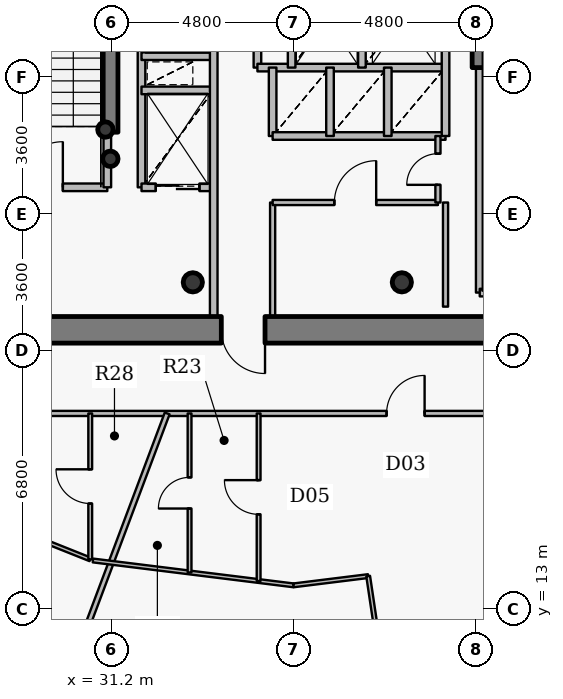
"""IFC4 building model, lengths in metres.
Left out: names, types, materials, properties, quantities, classifications, styles, units other than length and angle.
Written with IfcOpenShell. Run it as: python <this file> out.ifc"""

import sys

from ifc_helpers import new_model, si_unit, direction, frame, frame_2d, origin, origin_2d, place, context, subcontext, project, spatial, rectangle, hollow_circle, extrude, source, transform, mapped, element, fill, save


model = new_model("IFC4")
c1 = context("Model", 3, precision=1e-05, world=origin(), true_north=direction((0.0, 1.0)))
c2 = subcontext(c1, "Body", "Model", "MODEL_VIEW")
j1 = project(units=[si_unit("LENGTHUNIT", "METRE"), si_unit("PLANEANGLEUNIT", "RADIAN")], contexts=[c1])
p1 = place(None, origin())
s1 = spatial("IfcSite", under=j1, at=p1, CompositionType="ELEMENT")
p2 = place(p1, origin())
s2 = spatial("IfcBuilding", under=s1, at=p2, CompositionType="ELEMENT")
p3 = place(p2, frame((0.0, 0.0, 225.3)))
s3 = spatial("IfcBuildingStorey", under=s2, at=p3, CompositionType="ELEMENT", Elevation=225.3)
for number, where, z_axis, x_axis in (
    (1, (33.35, 21.6, 0.0), (0.0, 0.0, 1.0), (1.0, 0.0, 0.0)),
    (2, (38.85, 21.6, 0.0), (0.0, 0.0, 1.0), (1.0, 0.0, 0.0)),
):
    element("IfcColumn", number, at=place(p3, frame(where, z_axis=z_axis, x_axis=x_axis)), inside=s3, PredefinedType="COLUMN", context=c2, shape_type="SweptSolid", body=[
        extrude(hollow_circle(Radius=0.254, WallThickness=0.02, at=origin_2d()), origin(), (0.0, 0.0, 1.0), 3.75),
    ])
for number, where, z_axis, x_axis in (
    (3, (31.05, 25.62, 0.0), (0.0, 0.0, 1.0), (1.0, 0.0, 0.0)),
    (4, (31.18, 24.85, 0.0), (0.0, 0.0, 1.0), (1.0, 0.0, 0.0)),
):
    element("IfcColumn", number, at=place(p3, frame(where, z_axis=z_axis, x_axis=x_axis)), inside=s3, PredefinedType="COLUMN", context=c2, shape_type="SweptSolid", body=[
        extrude(hollow_circle(Radius=0.203, WallThickness=0.016, at=origin_2d()), origin(), (0.0, 0.0, 1.0), 3.75),
    ])
p4 = place(p3, frame((44.95, 20.35, 0.0), z_axis=(0.0, 0.0, 1.0), x_axis=(-1.0, 0.0, 0.0)))
e5 = element("IfcWall", 5, at=p4, inside=s3, PredefinedType="SHEAR", context=c2, shape_type="SweptSolid", body=[
    extrude(rectangle(XDim=17.9, YDim=0.7, at=frame_2d((8.95, 0.0))), origin(), (0.0, 0.0, 1.0), 3.05),
])
p5 = place(p4, frame((9.7, 0.0, 0.0)))
e6 = element("IfcOpeningElement", 6, at=p5, cuts=e5, PredefinedType="OPENING", context=c2, shape_type="SweptSolid", body=[
    extrude(rectangle(XDim=1.15, YDim=2.15, at=origin_2d()), frame((0.575, 0.36, 1.075), z_axis=(0.0, -1.0, 0.0), x_axis=(1.0, 0.0, 0.0)), (0.0, 0.0, 1.0), 0.72),
])
p6 = place(p3, frame((31.18, 25.55, 0.0), z_axis=(0.0, 0.0, 1.0), x_axis=(0.0, 1.0, 0.0)))
e7 = element("IfcWall", 7, at=p6, inside=s3, PredefinedType="SHEAR", context=c2, shape_type="SweptSolid", body=[
    extrude(rectangle(XDim=2.25, YDim=0.4, at=frame_2d((1.125, 0.0))), origin(), (0.0, 0.0, 1.0), 3.1),
])
p7 = place(p3, frame((40.9, 27.25, 0.0), z_axis=(0.0, 0.0, 1.0), x_axis=(0.0, 1.0, 0.0)))
e8 = element("IfcWall", 8, at=p7, inside=s3, PredefinedType="SHEAR", context=c2, shape_type="SweptSolid", body=[
    extrude(rectangle(XDim=2.6, YDim=0.4, at=frame_2d((1.3, 0.0))), origin(), (0.0, 0.0, 1.0), 3.1),
])
p8 = place(p3, frame((24.35, 18.15, 0.0), z_axis=(0.0, 0.0, 1.0), x_axis=(1.0, 0.0, 0.0)))
e9 = element("IfcWall", 9, at=p8, inside=s3, PredefinedType="PARTITIONING", context=c2, shape_type="SweptSolid", body=[
    extrude(rectangle(XDim=23.85, YDim=0.135, at=frame_2d((11.925, 0.0))), origin(), (0.0, 0.0, 1.0), 2.935),
])
p9 = place(p8, frame((14.099, 0.0, 0.0)))
e10 = element("IfcOpeningElement", 10, at=p9, cuts=e9, PredefinedType="OPENING", context=c2, shape_type="SweptSolid", body=[
    extrude(rectangle(XDim=1.0, YDim=2.15, at=origin_2d()), frame((0.5, 0.078, 1.075), z_axis=(0.0, -1.0, 0.0), x_axis=(1.0, 0.0, 0.0)), (0.0, 0.0, 1.0), 0.155),
])
p10 = place(p8, frame((20.638, 0.0, 0.0)))
e11 = element("IfcOpeningElement", 11, at=p10, cuts=e9, PredefinedType="OPENING", context=c2, shape_type="SweptSolid", body=[
    extrude(rectangle(XDim=1.0, YDim=2.15, at=origin_2d()), frame((0.5, 0.078, 1.075), z_axis=(0.0, -1.0, 0.0), x_axis=(1.0, 0.0, 0.0)), (0.0, 0.0, 1.0), 0.155),
])
p11 = place(p3, frame((25.961, 16.181, 0.0), z_axis=(0.0, 0.0, 1.0), x_axis=(0.928803127631, -0.370573542098, 0.0)))
e12 = element("IfcWall", 12, at=p11, inside=s3, PredefinedType="PARTITIONING", context=c2, shape_type="SweptSolid", body=[
    extrude(rectangle(XDim=5.049, YDim=0.1, at=frame_2d((2.524, 0.0))), origin(), (0.0, 0.0, 1.0), 2.935),
])
p12 = place(p3, frame((27.56, 24.1, 0.0), z_axis=(0.0, 0.0, 1.0), x_axis=(1.0, 0.0, 0.0)))
e13 = element("IfcWall", 13, at=p12, inside=s3, PredefinedType="PARTITIONING", context=c2, shape_type="SweptSolid", body=[
    extrude(rectangle(XDim=3.54, YDim=0.2, at=frame_2d((1.77, 0.0))), origin(), (0.0, 0.0, 1.0), 3.5),
])
p13 = place(p12, frame((1.17, 0.0, 0.0)))
e14 = element("IfcOpeningElement", 14, at=p13, cuts=e13, PredefinedType="OPENING", context=c2, shape_type="SweptSolid", body=[
    extrude(rectangle(XDim=1.2, YDim=2.15, at=origin_2d()), frame((0.6, 0.11, 1.075), z_axis=(0.0, -1.0, 0.0), x_axis=(1.0, 0.0, 0.0)), (0.0, 0.0, 1.0), 0.22),
])
p14 = place(p3, frame((29.169, 8.819, 0.0), z_axis=(0.0, 0.0, 1.0), x_axis=(0.351676288836, 0.936121673646, 0.0)))
e15 = element("IfcWall", 15, at=p14, inside=s3, PredefinedType="PARTITIONING", context=c2, shape_type="SweptSolid", body=[
    extrude(rectangle(XDim=9.968, YDim=0.135, at=frame_2d((4.984, 0.0))), origin(), (0.0, 0.0, 1.0), 2.985),
])
p15 = place(p3, frame((30.65, 14.31, 0.0), z_axis=(0.0, 0.0, 1.0), x_axis=(0.0, 1.0, 0.0)))
e16 = element("IfcWall", 16, at=p15, inside=s3, PredefinedType="PARTITIONING", context=c2, shape_type="SweptSolid", body=[
    extrude(rectangle(XDim=3.84, YDim=0.1, at=frame_2d((1.92, 0.0))), origin(), (0.0, 0.0, 1.0), 3.5),
])
p16 = place(p15, frame((1.47, 0.0, 0.0)))
e17 = element("IfcOpeningElement", 17, at=p16, cuts=e16, PredefinedType="OPENING", context=c2, shape_type="SweptSolid", body=[
    extrude(rectangle(XDim=0.9, YDim=2.1, at=origin_2d()), frame((0.45, 0.06, 1.05), z_axis=(0.0, -1.0, 0.0), x_axis=(1.0, 0.0, 0.0)), (0.0, 0.0, 1.0), 0.12),
])
p17 = place(p3, frame((30.722, 14.281, 0.0), z_axis=(0.0, 0.0, 1.0), x_axis=(0.992398169186, -0.123068573551, 0.0)))
e18 = element("IfcWall", 18, at=p17, inside=s3, PredefinedType="PARTITIONING", context=c2, shape_type="SweptSolid", body=[
    extrude(rectangle(XDim=5.319, YDim=0.1, at=frame_2d((2.659, 0.0))), origin(), (0.0, 0.0, 1.0), 2.935),
])
p18 = place(p3, frame((31.1, 24.1, 0.0), z_axis=(0.0, 0.0, 1.0), x_axis=(0.0, 1.0, 0.0)))
e19 = element("IfcWall", 19, at=p18, inside=s3, PredefinedType="PARTITIONING", context=c2, shape_type="SweptSolid", body=[
    extrude(rectangle(XDim=1.44, YDim=0.2, at=frame_2d((0.72, 0.0))), origin(), (0.0, 0.0, 1.0), 3.5),
])
p19 = place(p3, frame((32.0, 24.1, 0.0), z_axis=(0.0, 0.0, 1.0), x_axis=(0.0, 1.0, 0.0)))
e20 = element("IfcWall", 20, at=p19, inside=s3, PredefinedType="PARTITIONING", context=c2, shape_type="SweptSolid", body=[
    extrude(rectangle(XDim=8.0, YDim=0.2, at=frame_2d((4.0, 0.0))), origin(), (0.0, 0.0, 1.0), 3.5),
])
p20 = place(p3, frame((32.0, 24.1, 0.0), z_axis=(0.0, 0.0, 1.0), x_axis=(1.0, 0.0, 0.0)))
e21 = element("IfcWall", 21, at=p20, inside=s3, PredefinedType="PARTITIONING", context=c2, shape_type="SweptSolid", body=[
    extrude(rectangle(XDim=1.9, YDim=0.2, at=frame_2d((0.95, 0.0))), origin(), (0.0, 0.0, 1.0), 3.085),
])
p21 = place(p20, frame((0.375, 0.0, 0.0)))
e22 = element("IfcOpeningElement", 22, at=p21, cuts=e21, PredefinedType="OPENING", context=c2, shape_type="SweptSolid", body=[
    extrude(rectangle(XDim=1.15, YDim=2.15, at=origin_2d()), frame((0.575, 0.11, 1.075), z_axis=(0.0, -1.0, 0.0), x_axis=(1.0, 0.0, 0.0)), (0.0, 0.0, 1.0), 0.22),
])
for number, where, z_axis, x_axis in (
    (23, (32.0, 26.65, 0.0), (0.0, 0.0, 1.0), (1.0, 0.0, 0.0)),
    (24, (32.0, 27.55, 0.0), (0.0, 0.0, 1.0), (1.0, 0.0, 0.0)),
):
    element("IfcWall", number, at=place(p3, frame(where, z_axis=z_axis, x_axis=x_axis)), inside=s3, PredefinedType="PARTITIONING", context=c2, shape_type="SweptSolid", body=[
        extrude(rectangle(XDim=1.9, YDim=0.2, at=frame_2d((0.95, 0.0))), origin(), (0.0, 0.0, 1.0), 3.085),
    ])
p22 = place(p3, frame((33.264, 13.966, 0.0), z_axis=(0.0, 0.0, 1.0), x_axis=(0.0, 1.0, 0.0)))
e25 = element("IfcWall", 25, at=p22, inside=s3, PredefinedType="PARTITIONING", context=c2, shape_type="SweptSolid", body=[
    extrude(rectangle(XDim=4.184, YDim=0.1, at=frame_2d((2.092, 0.0))), origin(), (0.0, 0.0, 1.0), 3.5),
])
p23 = place(p22, frame((1.682, 0.0, 0.0)))
e26 = element("IfcOpeningElement", 26, at=p23, cuts=e25, PredefinedType="OPENING", context=c2, shape_type="SweptSolid", body=[
    extrude(rectangle(XDim=0.82, YDim=2.1, at=origin_2d()), frame((0.41, 0.06, 1.05), z_axis=(0.0, -1.0, 0.0), x_axis=(1.0, 0.0, 0.0)), (0.0, 0.0, 1.0), 0.12),
])
p24 = place(p3, frame((33.9, 20.7, 0.0), z_axis=(0.0, 0.0, 1.0), x_axis=(0.0, 1.0, 0.0)))
e27 = element("IfcWall", 27, at=p24, inside=s3, PredefinedType="PARTITIONING", context=c2, shape_type="SweptSolid", body=[
    extrude(rectangle(XDim=11.4, YDim=0.2, at=frame_2d((5.7, 0.0))), origin(), (0.0, 0.0, 1.0), 3.085),
])
p25 = place(p24, frame((7.08, 0.0, 0.0)))
e28 = element("IfcOpeningElement", 28, at=p25, cuts=e27, PredefinedType="OPENING", context=c2, shape_type="SweptSolid", body=[
    extrude(rectangle(XDim=1.05, YDim=2.15, at=origin_2d()), frame((0.525, 0.11, 1.075), z_axis=(0.0, -1.0, 0.0), x_axis=(1.0, 0.0, 0.0)), (0.0, 0.0, 1.0), 0.22),
])
p26 = place(p24, frame((8.595, 0.0, 0.0)))
e29 = element("IfcOpeningElement", 29, at=p26, cuts=e27, PredefinedType="OPENING", context=c2, shape_type="SweptSolid", body=[
    extrude(rectangle(XDim=1.05, YDim=2.15, at=origin_2d()), frame((0.525, 0.11, 1.075), z_axis=(0.0, -1.0, 0.0), x_axis=(1.0, 0.0, 0.0)), (0.0, 0.0, 1.0), 0.22),
])
p27 = place(p24, frame((10.095, 0.0, 0.0)))
e30 = element("IfcOpeningElement", 30, at=p27, cuts=e27, PredefinedType="OPENING", context=c2, shape_type="SweptSolid", body=[
    extrude(rectangle(XDim=1.05, YDim=2.15, at=origin_2d()), frame((0.525, 0.11, 1.075), z_axis=(0.0, -1.0, 0.0), x_axis=(1.0, 0.0, 0.0)), (0.0, 0.0, 1.0), 0.22),
])
p28 = place(p3, frame((35.05, 27.25, 0.0), z_axis=(0.0, 0.0, 1.0), x_axis=(0.0, 1.0, 0.0)))
e31 = element("IfcWall", 31, at=p28, inside=s3, PredefinedType="PARTITIONING", context=c2, shape_type="SweptSolid", body=[
    extrude(rectangle(XDim=3.6, YDim=0.2, at=frame_2d((1.8, 0.0))), origin(), (0.0, 0.0, 1.0), 3.5),
])
p29 = place(p28, frame((0.59, 0.0, 0.0)))
e32 = element("IfcOpeningElement", 32, at=p29, cuts=e31, PredefinedType="OPENING", context=c2, shape_type="SweptSolid", body=[
    extrude(rectangle(XDim=0.66, YDim=2.05, at=origin_2d()), frame((0.33, 0.11, 1.025), z_axis=(0.0, -1.0, 0.0), x_axis=(1.0, 0.0, 0.0)), (0.0, 0.0, 1.0), 0.22),
])
p30 = place(p28, frame((2.35, 0.0, 0.0)))
e33 = element("IfcOpeningElement", 33, at=p30, cuts=e31, PredefinedType="OPENING", context=c2, shape_type="SweptSolid", body=[
    extrude(rectangle(XDim=0.66, YDim=2.05, at=origin_2d()), frame((0.33, 0.11, 1.025), z_axis=(0.0, -1.0, 0.0), x_axis=(1.0, 0.0, 0.0)), (0.0, 0.0, 1.0), 0.22),
])
p31 = place(p3, frame((35.05, 27.25, 0.0), z_axis=(0.0, 0.0, 1.0), x_axis=(1.0, 0.0, 0.0)))
e34 = element("IfcWall", 34, at=p31, inside=s3, PredefinedType="PARTITIONING", context=c2, shape_type="SweptSolid", body=[
    extrude(rectangle(XDim=4.95, YDim=0.2, at=frame_2d((2.475, 0.0))), origin(), (0.0, 0.0, 1.0), 3.085),
])
p32 = place(p3, frame((35.082, 13.74, 0.0), z_axis=(0.0, 0.0, 1.0), x_axis=(0.0, 1.0, 0.0)))
e35 = element("IfcWall", 35, at=p32, inside=s3, PredefinedType="PARTITIONING", context=c2, shape_type="SweptSolid", body=[
    extrude(rectangle(XDim=4.409, YDim=0.1, at=frame_2d((2.205, 0.0))), origin(), (0.0, 0.0, 1.0), 3.5),
])
p33 = place(p32, frame((1.755, 0.0, 0.0)))
e36 = element("IfcOpeningElement", 36, at=p33, cuts=e35, PredefinedType="OPENING", context=c2, shape_type="SweptSolid", body=[
    extrude(rectangle(XDim=0.9, YDim=2.1, at=origin_2d()), frame((0.45, 0.06, 1.05), z_axis=(0.0, -1.0, 0.0), x_axis=(1.0, 0.0, 0.0)), (0.0, 0.0, 1.0), 0.12),
])
p34 = place(p3, frame((35.45, 20.7, 0.0), z_axis=(0.0, 0.0, 1.0), x_axis=(0.0, 1.0, 0.0)))
e37 = element("IfcWall", 37, at=p34, inside=s3, PredefinedType="PARTITIONING", context=c2, shape_type="SweptSolid", body=[
    extrude(rectangle(XDim=3.0, YDim=0.135, at=frame_2d((1.5, 0.0))), origin(), (0.0, 0.0, 1.0), 3.085),
])
p35 = place(p3, frame((35.45, 23.7, 0.0), z_axis=(0.0, 0.0, 1.0), x_axis=(1.0, 0.0, 0.0)))
e38 = element("IfcWall", 38, at=p35, inside=s3, PredefinedType="PARTITIONING", context=c2, shape_type="SweptSolid", body=[
    extrude(rectangle(XDim=4.35, YDim=0.135, at=frame_2d((2.175, 0.0))), origin(), (0.0, 0.0, 1.0), 3.085),
])
p36 = place(p35, frame((1.625, 0.0, 0.0)))
e39 = element("IfcOpeningElement", 39, at=p36, cuts=e38, PredefinedType="OPENING", context=c2, shape_type="SweptSolid", body=[
    extrude(rectangle(XDim=1.1, YDim=2.15, at=origin_2d()), frame((0.55, 0.078, 1.075), z_axis=(0.0, -1.0, 0.0), x_axis=(1.0, 0.0, 0.0)), (0.0, 0.0, 1.0), 0.155),
])
p37 = place(p3, frame((35.45, 25.45, 0.0), z_axis=(0.0, 0.0, 1.0), x_axis=(0.0, 1.0, 0.0)))
e40 = element("IfcWall", 40, at=p37, inside=s3, PredefinedType="PARTITIONING", context=c2, shape_type="SweptSolid", body=[
    extrude(rectangle(XDim=1.8, YDim=0.2, at=frame_2d((0.9, 0.0))), origin(), (0.0, 0.0, 1.0), 3.5),
])
p38 = place(p3, frame((35.45, 25.45, 0.0), z_axis=(0.0, 0.0, 1.0), x_axis=(1.0, 0.0, 0.0)))
e41 = element("IfcWall", 41, at=p38, inside=s3, PredefinedType="PARTITIONING", context=c2, shape_type="SweptSolid", body=[
    extrude(rectangle(XDim=4.55, YDim=0.2, at=frame_2d((2.275, 0.0))), origin(), (0.0, 0.0, 1.0), 3.085),
])
p39 = place(p3, frame((35.95, 27.25, 0.0), z_axis=(0.0, 0.0, 1.0), x_axis=(0.0, 1.0, 0.0)))
e42 = element("IfcWall", 42, at=p39, inside=s3, PredefinedType="PARTITIONING", context=c2, shape_type="SweptSolid", body=[
    extrude(rectangle(XDim=3.8, YDim=0.2, at=frame_2d((1.9, 0.0))), origin(), (0.0, 0.0, 1.0), 3.5),
])
p40 = place(p3, frame((36.0, 13.626, 0.0), z_axis=(0.0, 0.0, 1.0), x_axis=(0.992393208717, 0.123108567097, 0.0)))
e43 = element("IfcWall", 43, at=p40, inside=s3, PredefinedType="PARTITIONING", context=c2, shape_type="SweptSolid", body=[
    extrude(rectangle(XDim=1.979, YDim=0.1, at=frame_2d((0.99, 0.0))), origin(), (0.0, 0.0, 1.0), 2.935),
])
p41 = place(p3, frame((36.96, 25.45, 0.0), z_axis=(0.0, 0.0, 1.0), x_axis=(0.0, 1.0, 0.0)))
e44 = element("IfcWall", 44, at=p41, inside=s3, PredefinedType="PARTITIONING", context=c2, shape_type="SweptSolid", body=[
    extrude(rectangle(XDim=1.8, YDim=0.2, at=frame_2d((0.9, 0.0))), origin(), (0.0, 0.0, 1.0), 3.5),
])
p42 = place(p3, frame((37.8, 27.25, 0.0), z_axis=(0.0, 0.0, 1.0), x_axis=(0.0, 1.0, 0.0)))
e45 = element("IfcWall", 45, at=p42, inside=s3, PredefinedType="PARTITIONING", context=c2, shape_type="SweptSolid", body=[
    extrude(rectangle(XDim=2.6, YDim=0.2, at=frame_2d((1.3, 0.0))), origin(), (0.0, 0.0, 1.0), 3.5),
])
p43 = place(p3, frame((37.964, 13.87, 0.0), z_axis=(0.0, 0.0, 1.0), x_axis=(0.147933131181, -0.988997365365, 0.0)))
e46 = element("IfcWall", 46, at=p43, inside=s3, PredefinedType="PARTITIONING", context=c2, shape_type="SweptSolid", body=[
    extrude(rectangle(XDim=5.745, YDim=0.1, at=frame_2d((2.873, 0.0))), origin(), (0.0, 0.0, 1.0), 2.985),
])
p44 = place(p43, frame((2.422, 0.0, 0.0)))
e47 = element("IfcOpeningElement", 47, at=p44, cuts=e46, PredefinedType="OPENING", context=c2, shape_type="SweptSolid", body=[
    extrude(rectangle(XDim=0.9, YDim=2.1, at=origin_2d()), frame((0.45, 0.06, 1.05), z_axis=(0.0, -1.0, 0.0), x_axis=(1.0, 0.0, 0.0)), (0.0, 0.0, 1.0), 0.12),
])
p45 = place(p3, frame((38.48, 25.45, 0.0), z_axis=(0.0, 0.0, 1.0), x_axis=(0.0, 1.0, 0.0)))
e48 = element("IfcWall", 48, at=p45, inside=s3, PredefinedType="PARTITIONING", context=c2, shape_type="SweptSolid", body=[
    extrude(rectangle(XDim=1.8, YDim=0.2, at=frame_2d((0.9, 0.0))), origin(), (0.0, 0.0, 1.0), 3.5),
])
p46 = place(p3, frame((39.8, 23.7, 0.0), z_axis=(0.0, 0.0, 1.0), x_axis=(0.0, 1.0, 0.0)))
e49 = element("IfcWall", 49, at=p46, inside=s3, PredefinedType="PARTITIONING", context=c2, shape_type="SweptSolid", body=[
    extrude(rectangle(XDim=1.75, YDim=0.135, at=frame_2d((0.875, 0.0))), origin(), (0.0, 0.0, 1.0), 3.5),
])
p47 = place(p46, frame((0.465, 0.0, 0.0)))
e50 = element("IfcOpeningElement", 50, at=p47, cuts=e49, PredefinedType="OPENING", context=c2, shape_type="SweptSolid", body=[
    extrude(rectangle(XDim=0.82, YDim=2.1, at=origin_2d()), frame((0.41, 0.078, 1.05), z_axis=(0.0, -1.0, 0.0), x_axis=(1.0, 0.0, 0.0)), (0.0, 0.0, 1.0), 0.155),
])
p48 = place(p3, frame((40.0, 25.45, 0.0), z_axis=(0.0, 0.0, 1.0), x_axis=(0.0, 1.0, 0.0)))
e51 = element("IfcWall", 51, at=p48, inside=s3, PredefinedType="PARTITIONING", context=c2, shape_type="SweptSolid", body=[
    extrude(rectangle(XDim=4.4, YDim=0.2, at=frame_2d((2.2, 0.0))), origin(), (0.0, 0.0, 1.0), 3.5),
])
p49 = place(p3, frame((40.9, 21.33, 0.0), z_axis=(0.0, 0.0, 1.0), x_axis=(0.0, 1.0, 0.0)))
e52 = element("IfcWall", 52, at=p49, inside=s3, PredefinedType="PARTITIONING", context=c2, shape_type="SweptSolid", body=[
    extrude(rectangle(XDim=5.91, YDim=0.2, at=frame_2d((2.955, 0.0))), origin(), (0.0, 0.0, 1.0), 3.035),
])
p50 = place(p3, frame((40.9, 21.33, 0.0), z_axis=(0.0, 0.0, 1.0), x_axis=(1.0, 0.0, 0.0)))
e53 = element("IfcWall", 53, at=p50, inside=s3, PredefinedType="PARTITIONING", context=c2, shape_type="SweptSolid", body=[
    extrude(rectangle(XDim=0.25, YDim=0.2, at=frame_2d((0.125, 0.0))), origin(), (0.0, 0.0, 1.0), 3.035),
])
p51 = place(p3, frame((40.0, 23.7, 0.0), z_axis=(0.0, 0.0, 1.0), x_axis=(0.0, -1.0, 0.0)))
e54 = element("IfcWall", 54, at=p51, inside=s3, PredefinedType="PARTITIONING", context=c2, shape_type="SweptSolid", body=[
    extrude(rectangle(XDim=2.74, YDim=0.135, at=frame_2d((1.37, 0.0))), origin(), (0.0, 0.0, 1.0), 3.035),
])
m1 = source(origin(), c2, "Body", "SweptSolid", [
    extrude(rectangle(XDim=1.15, YDim=2.15, at=origin_2d()), frame((0.575, 0.025, 1.075), z_axis=(0.0, -1.0, 0.0), x_axis=(1.0, 0.0, 0.0)), (0.0, 0.0, 1.0), 0.05),
])
p52 = place(p5, origin())
e55 = element("IfcDoor", 55, at=p52, inside=s3, OperationType="SINGLE_SWING_LEFT", PredefinedType="DOOR", context=c2, shape_type="MappedRepresentation", body=[
    mapped(m1, transform((0.0, 0.0, 0.0), x_axis=(1.0, 0.0, 0.0), y_axis=(0.0, 1.0, 0.0), z_axis=(0.0, 0.0, 1.0), scale=1.0)),
])
fill(e6, e55)
m2 = source(origin(), c2, "Body", "SweptSolid", [
    extrude(rectangle(XDim=1.2, YDim=2.15, at=origin_2d()), frame((0.6, 0.025, 1.075), z_axis=(0.0, -1.0, 0.0), x_axis=(1.0, 0.0, 0.0)), (0.0, 0.0, 1.0), 0.05),
])
p53 = place(p13, origin())
e56 = element("IfcDoor", 56, at=p53, inside=s3, OperationType="SINGLE_SWING_RIGHT", PredefinedType="DOOR", context=c2, shape_type="MappedRepresentation", body=[
    mapped(m2, transform((0.0, 0.0, 0.0), x_axis=(1.0, 0.0, 0.0), y_axis=(0.0, 1.0, 0.0), z_axis=(0.0, 0.0, 1.0), scale=1.0)),
])
fill(e14, e56)
m3 = source(origin(), c2, "Body", "SweptSolid", [
    extrude(rectangle(XDim=1.15, YDim=2.15, at=origin_2d()), frame((0.575, 0.025, 1.075), z_axis=(0.0, -1.0, 0.0), x_axis=(1.0, 0.0, 0.0)), (0.0, 0.0, 1.0), 0.05),
])
p54 = place(p21, origin())
e57 = element("IfcDoor", 57, at=p54, inside=s3, OperationType="DOUBLE_DOOR_SLIDING", PredefinedType="USERDEFINED", context=c2, shape_type="MappedRepresentation", body=[
    mapped(m3, transform((0.0, 0.0, 0.0), x_axis=(1.0, 0.0, 0.0), y_axis=(0.0, 1.0, 0.0), z_axis=(0.0, 0.0, 1.0), scale=1.0)),
])
fill(e22, e57)
m4 = source(origin(), c2, "Body", "SweptSolid", [
    extrude(rectangle(XDim=0.9, YDim=2.1, at=origin_2d()), frame((0.45, 0.025, 1.05), z_axis=(0.0, -1.0, 0.0), x_axis=(1.0, 0.0, 0.0)), (0.0, 0.0, 1.0), 0.05),
])
p55 = place(p16, origin())
e58 = element("IfcDoor", 58, at=p55, inside=s3, OperationType="SINGLE_SWING_RIGHT", PredefinedType="DOOR", context=c2, shape_type="MappedRepresentation", body=[
    mapped(m4, transform((0.0, 0.0, 0.0), x_axis=(1.0, 0.0, 0.0), y_axis=(0.0, 1.0, 0.0), z_axis=(0.0, 0.0, 1.0), scale=1.0)),
])
fill(e17, e58)
m5 = source(origin(), c2, "Body", "SweptSolid", [
    extrude(rectangle(XDim=1.0, YDim=2.15, at=origin_2d()), frame((0.5, 0.025, 1.075), z_axis=(0.0, -1.0, 0.0), x_axis=(1.0, 0.0, 0.0)), (0.0, 0.0, 1.0), 0.05),
])
p56 = place(p9, origin())
e59 = element("IfcDoor", 59, at=p56, inside=s3, OperationType="SINGLE_SWING_RIGHT", PredefinedType="DOOR", context=c2, shape_type="MappedRepresentation", body=[
    mapped(m5, transform((0.0, 0.0, 0.0), x_axis=(1.0, 0.0, 0.0), y_axis=(0.0, 1.0, 0.0), z_axis=(0.0, 0.0, 1.0), scale=1.0)),
])
fill(e10, e59)
p57 = place(p33, origin())
e60 = element("IfcDoor", 60, at=p57, inside=s3, OperationType="SINGLE_SWING_RIGHT", PredefinedType="DOOR", context=c2, shape_type="MappedRepresentation", body=[
    mapped(m4, transform((0.0, 0.0, 0.0), x_axis=(1.0, 0.0, 0.0), y_axis=(0.0, 1.0, 0.0), z_axis=(0.0, 0.0, 1.0), scale=1.0)),
])
fill(e36, e60)
m6 = source(origin(), c2, "Body", "SweptSolid", [
    extrude(rectangle(XDim=0.82, YDim=2.1, at=origin_2d()), frame((0.41, 0.025, 1.05), z_axis=(0.0, -1.0, 0.0), x_axis=(1.0, 0.0, 0.0)), (0.0, 0.0, 1.0), 0.05),
])
p58 = place(p23, origin())
e61 = element("IfcDoor", 61, at=p58, inside=s3, OperationType="SINGLE_SWING_LEFT", PredefinedType="DOOR", context=c2, shape_type="MappedRepresentation", body=[
    mapped(m6, transform((0.0, 0.0, 0.0), x_axis=(1.0, 0.0, 0.0), y_axis=(0.0, 1.0, 0.0), z_axis=(0.0, 0.0, 1.0), scale=1.0)),
])
fill(e26, e61)
m7 = source(origin(), c2, "Body", "SweptSolid", [
    extrude(rectangle(XDim=1.1, YDim=2.15, at=origin_2d()), frame((0.55, 0.025, 1.075), z_axis=(0.0, -1.0, 0.0), x_axis=(1.0, 0.0, 0.0)), (0.0, 0.0, 1.0), 0.05),
])
p59 = place(p36, origin())
e62 = element("IfcDoor", 62, at=p59, inside=s3, OperationType="SINGLE_SWING_RIGHT", PredefinedType="DOOR", context=c2, shape_type="MappedRepresentation", body=[
    mapped(m7, transform((0.0, 0.0, 0.0), x_axis=(1.0, 0.0, 0.0), y_axis=(0.0, 1.0, 0.0), z_axis=(0.0, 0.0, 1.0), scale=1.0)),
])
fill(e39, e62)
p60 = place(p47, origin())
e63 = element("IfcDoor", 63, at=p60, inside=s3, OperationType="SINGLE_SWING_LEFT", PredefinedType="DOOR", context=c2, shape_type="MappedRepresentation", body=[
    mapped(m6, transform((0.0, 0.0, 0.0), x_axis=(1.0, 0.0, 0.0), y_axis=(0.0, 1.0, 0.0), z_axis=(0.0, 0.0, 1.0), scale=1.0)),
])
fill(e50, e63)
save(model, sys.argv[1])
